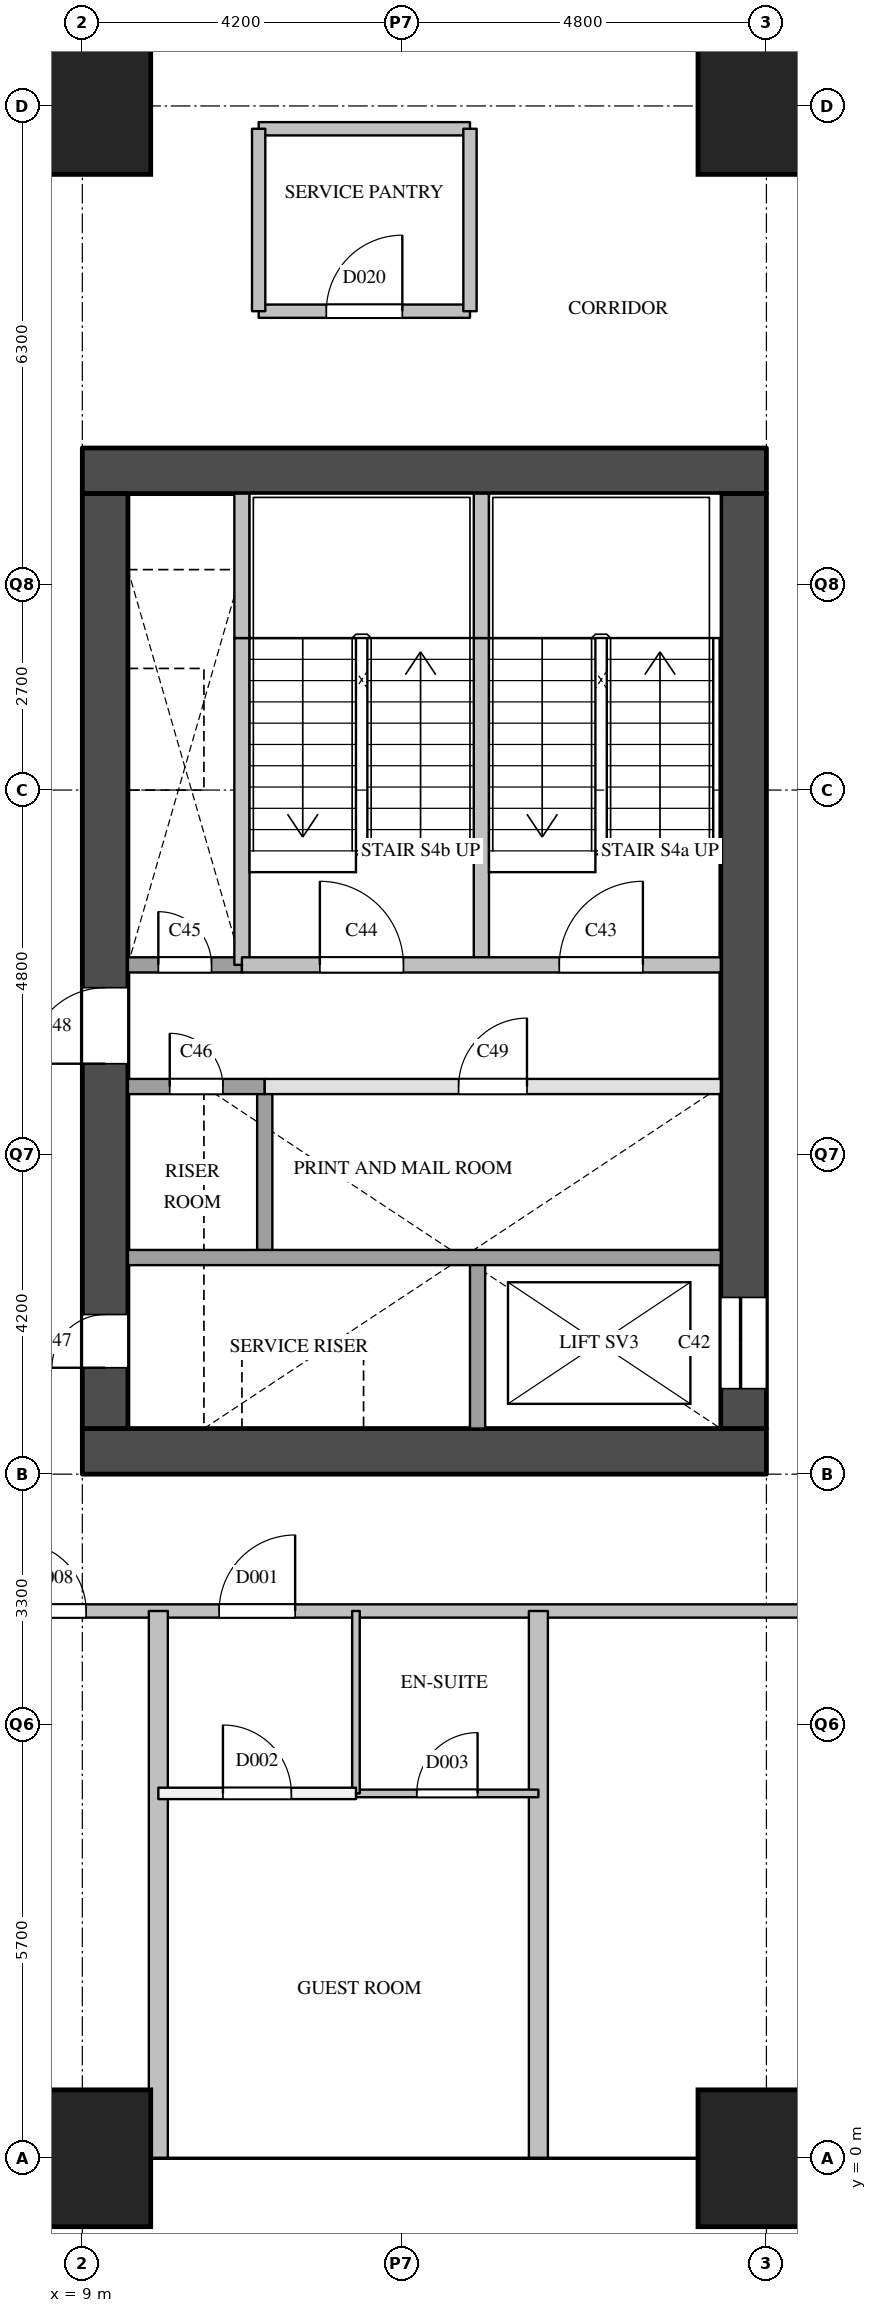
"""IFC4 building model, lengths in metres.
Left out: names, types, materials, properties, quantities, classifications, styles, units other than length and angle.
Written with IfcOpenShell. Run it as: python <this file> out.ifc"""

import sys

from ifc_helpers import new_model, si_unit, direction, frame, frame_2d, origin, origin_2d, place, context, subcontext, project, spatial, rectangle, extrude, element, fill, save


model = new_model("IFC4")
c1 = context("Model", 3, precision=1e-05, world=origin(), true_north=direction((0.0, 1.0)))
c2 = subcontext(c1, "Body", "Model", "MODEL_VIEW")
j1 = project(units=[si_unit("LENGTHUNIT", "METRE"), si_unit("PLANEANGLEUNIT", "RADIAN")], contexts=[c1])
p1 = place(None, origin())
s1 = spatial("IfcSite", under=j1, at=p1, CompositionType="ELEMENT")
p2 = place(p1, origin())
s2 = spatial("IfcBuilding", under=s1, at=p2, CompositionType="ELEMENT")
p3 = place(p2, frame((0.0, 0.0, 42.4)))
s3 = spatial("IfcBuildingStorey", under=s2, at=p3, CompositionType="ELEMENT", Elevation=42.4)
for number, where, z_axis, x_axis in (
    (1, (9.0, 0.0, 0.0), (0.0, 0.0, 1.0), (1.0, 0.0, 0.0)),
    (2, (9.0, 27.0, 0.0), (0.0, 0.0, 1.0), (1.0, 0.0, 0.0)),
    (3, (18.0, 0.0, 0.0), (0.0, 0.0, 1.0), (1.0, 0.0, 0.0)),
    (4, (18.0, 27.0, 0.0), (0.0, 0.0, 1.0), (1.0, 0.0, 0.0)),
):
    element("IfcColumn", number, at=place(p3, frame(where, z_axis=z_axis, x_axis=x_axis)), inside=s3, PredefinedType="COLUMN", context=c2, shape_type="SweptSolid", body=[
        extrude(rectangle(XDim=1.8, YDim=1.8, at=origin_2d()), origin(), (0.0, 0.0, 1.0), 3.8),
    ])
for number, where, z_axis, x_axis in (
    (5, (9.0, 9.3, 0.0), (0.0, 0.0, 1.0), (1.0, 0.0, 0.0)),
    (6, (9.0, 22.2, 0.0), (0.0, 0.0, 1.0), (1.0, 0.0, 0.0)),
):
    element("IfcWall", number, at=place(p3, frame(where, z_axis=z_axis, x_axis=x_axis)), inside=s3, PredefinedType="SHEAR", context=c2, shape_type="SweptSolid", body=[
        extrude(rectangle(XDim=9.0, YDim=0.6, at=frame_2d((4.5, 0.0))), origin(), (0.0, 0.0, 1.0), 3.5),
    ])
p4 = place(p3, frame((9.3, 9.6, 0.0), z_axis=(0.0, 0.0, 1.0), x_axis=(0.0, 1.0, 0.0)))
e7 = element("IfcWall", 7, at=p4, inside=s3, PredefinedType="SHEAR", context=c2, shape_type="SweptSolid", body=[
    extrude(rectangle(XDim=12.3, YDim=0.6, at=frame_2d((6.15, 0.0))), origin(), (0.0, 0.0, 1.0), 3.5),
])
p5 = place(p4, frame((0.8, 0.0, 0.0)))
e8 = element("IfcOpeningElement", 8, at=p5, cuts=e7, PredefinedType="OPENING", context=c2, shape_type="SweptSolid", body=[
    extrude(rectangle(XDim=0.7, YDim=2.1, at=frame_2d((0.35, 1.05))), frame((0.0, 0.31, 0.0), z_axis=(0.0, -1.0, 0.0), x_axis=(1.0, 0.0, 0.0)), (0.0, 0.0, 1.0), 0.62),
])
p6 = place(p4, frame((4.8, 0.0, 0.0)))
e9 = element("IfcOpeningElement", 9, at=p6, cuts=e7, PredefinedType="OPENING", context=c2, shape_type="SweptSolid", body=[
    extrude(rectangle(XDim=1.0, YDim=2.1, at=frame_2d((0.5, 1.05))), frame((0.0, 0.31, 0.0), z_axis=(0.0, -1.0, 0.0), x_axis=(1.0, 0.0, 0.0)), (0.0, 0.0, 1.0), 0.62),
])
p7 = place(p3, frame((17.7, 9.6, 0.0), z_axis=(0.0, 0.0, 1.0), x_axis=(0.0, 1.0, 0.0)))
e10 = element("IfcWall", 10, at=p7, inside=s3, PredefinedType="SHEAR", context=c2, shape_type="SweptSolid", body=[
    extrude(rectangle(XDim=12.3, YDim=0.6, at=frame_2d((6.15, 0.0))), origin(), (0.0, 0.0, 1.0), 3.5),
])
p8 = place(p7, frame((0.525, 0.0, 0.0)))
e11 = element("IfcOpeningElement", 11, at=p8, cuts=e10, PredefinedType="OPENING", context=c2, shape_type="SweptSolid", body=[
    extrude(rectangle(XDim=1.2, YDim=2.1, at=frame_2d((0.6, 1.05))), frame((0.0, 0.31, 0.0), z_axis=(0.0, -1.0, 0.0), x_axis=(1.0, 0.0, 0.0)), (0.0, 0.0, 1.0), 0.62),
])
p9 = place(p3, frame((11.1, 15.7, 0.0), z_axis=(0.0, 0.0, 1.0), x_axis=(0.0, 1.0, 0.0)))
e12 = element("IfcWall", 12, at=p9, inside=s3, PredefinedType="SOLIDWALL", context=c2, shape_type="SweptSolid", body=[
    extrude(rectangle(XDim=4.3, YDim=0.2, at=frame_2d((2.15, 0.0))), origin(), (0.0, 0.0, 1.0), 3.5),
])
p10 = place(p3, frame((11.1, 20.0, 0.0), z_axis=(0.0, 0.0, 1.0), x_axis=(0.0, 1.0, 0.0)))
e13 = element("IfcWall", 13, at=p10, inside=s3, PredefinedType="SOLIDWALL", context=c2, shape_type="SweptSolid", body=[
    extrude(rectangle(XDim=1.9, YDim=0.2, at=frame_2d((0.95, 0.0))), origin(), (0.0, 0.0, 1.0), 3.5),
])
p11 = place(p3, frame((11.4, 11.9, 0.0), z_axis=(0.0, 0.0, 1.0), x_axis=(0.0, 1.0, 0.0)))
e14 = element("IfcWall", 14, at=p11, inside=s3, PredefinedType="SOLIDWALL", context=c2, shape_type="SweptSolid", body=[
    extrude(rectangle(XDim=2.2, YDim=0.2, at=frame_2d((1.1, 0.0))), origin(), (0.0, 0.0, 1.0), 3.5),
])
p12 = place(p3, frame((14.2, 9.6, 0.0), z_axis=(0.0, 0.0, 1.0), x_axis=(0.0, 1.0, 0.0)))
e15 = element("IfcWall", 15, at=p12, inside=s3, PredefinedType="SOLIDWALL", context=c2, shape_type="SweptSolid", body=[
    extrude(rectangle(XDim=2.3, YDim=0.2, at=frame_2d((1.15, 0.0))), origin(), (0.0, 0.0, 1.0), 3.5),
])
p13 = place(p3, frame((14.25, 15.7, 0.0), z_axis=(0.0, 0.0, 1.0), x_axis=(0.0, 1.0, 0.0)))
e16 = element("IfcWall", 16, at=p13, inside=s3, PredefinedType="SOLIDWALL", context=c2, shape_type="SweptSolid", body=[
    extrude(rectangle(XDim=4.3, YDim=0.2, at=frame_2d((2.15, 0.0))), origin(), (0.0, 0.0, 1.0), 3.5),
])
p14 = place(p3, frame((14.25, 20.0, 0.0), z_axis=(0.0, 0.0, 1.0), x_axis=(0.0, 1.0, 0.0)))
e17 = element("IfcWall", 17, at=p14, inside=s3, PredefinedType="SOLIDWALL", context=c2, shape_type="SweptSolid", body=[
    extrude(rectangle(XDim=1.9, YDim=0.2, at=frame_2d((0.95, 0.0))), origin(), (0.0, 0.0, 1.0), 3.5),
])
p15 = place(p3, frame((9.6, 11.85, 0.0), z_axis=(0.0, 0.0, 1.0), x_axis=(1.0, 0.0, 0.0)))
e18 = element("IfcWall", 18, at=p15, inside=s3, PredefinedType="SOLIDWALL", context=c2, shape_type="SweptSolid", body=[
    extrude(rectangle(XDim=7.8, YDim=0.2, at=frame_2d((3.9, 0.0))), origin(), (0.0, 0.0, 1.0), 3.5),
])
p16 = place(p3, frame((11.4, 14.1, 0.0), z_axis=(0.0, 0.0, 1.0), x_axis=(1.0, 0.0, 0.0)))
e19 = element("IfcWall", 19, at=p16, inside=s3, PredefinedType="PARTITIONING", context=c2, shape_type="SweptSolid", body=[
    extrude(rectangle(XDim=6.0, YDim=0.2, at=frame_2d((3.0, 0.0))), origin(), (0.0, 0.0, 1.0), 3.5),
])
p17 = place(p16, frame((2.55, 0.0, 0.0)))
e20 = element("IfcOpeningElement", 20, at=p17, cuts=e19, PredefinedType="OPENING", context=c2, shape_type="SweptSolid", body=[
    extrude(rectangle(XDim=0.9, YDim=2.1, at=frame_2d((0.45, 1.05))), frame((0.0, 0.11, 0.0), z_axis=(0.0, -1.0, 0.0), x_axis=(1.0, 0.0, 0.0)), (0.0, 0.0, 1.0), 0.22),
])
p18 = place(p3, frame((9.6, 14.1, 0.0), z_axis=(0.0, 0.0, 1.0), x_axis=(1.0, 0.0, 0.0)))
e21 = element("IfcWall", 21, at=p18, inside=s3, PredefinedType="SOLIDWALL", context=c2, shape_type="SweptSolid", body=[
    extrude(rectangle(XDim=1.8, YDim=0.2, at=frame_2d((0.9, 0.0))), origin(), (0.0, 0.0, 1.0), 3.5),
])
p19 = place(p18, frame((0.55, 0.0, 0.0)))
e22 = element("IfcOpeningElement", 22, at=p19, cuts=e21, PredefinedType="OPENING", context=c2, shape_type="SweptSolid", body=[
    extrude(rectangle(XDim=0.7, YDim=2.1, at=frame_2d((0.35, 1.05))), frame((0.0, 0.11, 0.0), z_axis=(0.0, -1.0, 0.0), x_axis=(1.0, 0.0, 0.0)), (0.0, 0.0, 1.0), 0.22),
])
p20 = place(p3, frame((9.6, 15.7, 0.0), z_axis=(0.0, 0.0, 1.0), x_axis=(1.0, 0.0, 0.0)))
e23 = element("IfcWall", 23, at=p20, inside=s3, PredefinedType="SOLIDWALL", context=c2, shape_type="SweptSolid", body=[
    extrude(rectangle(XDim=1.5, YDim=0.2, at=frame_2d((0.75, 0.0))), origin(), (0.0, 0.0, 1.0), 3.5),
])
p21 = place(p20, frame((0.4, 0.0, 0.0)))
e24 = element("IfcOpeningElement", 24, at=p21, cuts=e23, PredefinedType="OPENING", context=c2, shape_type="SweptSolid", body=[
    extrude(rectangle(XDim=0.7, YDim=2.1, at=frame_2d((0.35, 1.05))), frame((0.0, 0.11, 0.0), z_axis=(0.0, -1.0, 0.0), x_axis=(1.0, 0.0, 0.0)), (0.0, 0.0, 1.0), 0.22),
])
p22 = place(p3, frame((11.1, 15.7, 0.0), z_axis=(0.0, 0.0, 1.0), x_axis=(1.0, 0.0, 0.0)))
e25 = element("IfcWall", 25, at=p22, inside=s3, PredefinedType="SOLIDWALL", context=c2, shape_type="SweptSolid", body=[
    extrude(rectangle(XDim=6.3, YDim=0.2, at=frame_2d((3.15, 0.0))), origin(), (0.0, 0.0, 1.0), 3.5),
])
p23 = place(p22, frame((4.175, 0.0, 0.0)))
e26 = element("IfcOpeningElement", 26, at=p23, cuts=e25, PredefinedType="OPENING", context=c2, shape_type="SweptSolid", body=[
    extrude(rectangle(XDim=1.1, YDim=2.1, at=frame_2d((0.55, 1.05))), frame((0.0, 0.11, 0.0), z_axis=(0.0, -1.0, 0.0), x_axis=(1.0, 0.0, 0.0)), (0.0, 0.0, 1.0), 0.22),
])
p24 = place(p22, frame((1.025, 0.0, 0.0)))
e27 = element("IfcOpeningElement", 27, at=p24, cuts=e25, PredefinedType="OPENING", context=c2, shape_type="SweptSolid", body=[
    extrude(rectangle(XDim=1.1, YDim=2.1, at=frame_2d((0.55, 1.05))), frame((0.0, 0.11, 0.0), z_axis=(0.0, -1.0, 0.0), x_axis=(1.0, 0.0, 0.0)), (0.0, 0.0, 1.0), 0.22),
])
p25 = place(p3, frame((7.2, 7.2, 0.0), z_axis=(0.0, 0.0, 1.0), x_axis=(1.0, 0.0, 0.0)))
e28 = element("IfcWall", 28, at=p25, inside=s3, PredefinedType="PARTITIONING", context=c2, shape_type="SweptSolid", body=[
    extrude(rectangle(XDim=12.6, YDim=0.175, at=frame_2d((6.3, 0.0))), origin(), (0.0, 0.0, 1.0), 3.5),
])
p26 = place(p25, frame((3.6, 0.0, 0.0)))
e29 = element("IfcOpeningElement", 29, at=p26, cuts=e28, PredefinedType="OPENING", context=c2, shape_type="SweptSolid", body=[
    extrude(rectangle(XDim=1.0, YDim=2.1, at=frame_2d((0.5, 1.05))), frame((0.0, 0.097, 0.0), z_axis=(0.0, -1.0, 0.0), x_axis=(1.0, 0.0, 0.0)), (0.0, 0.0, 1.0), 0.195),
])
p27 = place(p25, frame((0.95, 0.0, 0.0)))
e30 = element("IfcOpeningElement", 30, at=p27, cuts=e28, PredefinedType="OPENING", context=c2, shape_type="SweptSolid", body=[
    extrude(rectangle(XDim=0.9, YDim=2.1, at=frame_2d((0.45, 1.05))), frame((0.0, 0.097, 0.0), z_axis=(0.0, -1.0, 0.0), x_axis=(1.0, 0.0, 0.0)), (0.0, 0.0, 1.0), 0.195),
])
p28 = place(p3, frame((11.32, 24.3, 0.0), z_axis=(0.0, 0.0, 1.0), x_axis=(1.0, 0.0, 0.0)))
e31 = element("IfcWall", 31, at=p28, inside=s3, PredefinedType="PARTITIONING", context=c2, shape_type="SweptSolid", body=[
    extrude(rectangle(XDim=2.78, YDim=0.175, at=frame_2d((1.39, 0.0))), origin(), (0.0, 0.0, 1.0), 3.5),
])
p29 = place(p28, frame((0.89, 0.0, 0.0)))
e32 = element("IfcOpeningElement", 32, at=p29, cuts=e31, PredefinedType="OPENING", context=c2, shape_type="SweptSolid", body=[
    extrude(rectangle(XDim=1.0, YDim=2.1, at=frame_2d((0.5, 1.05))), frame((0.0, 0.097, 0.0), z_axis=(0.0, -1.0, 0.0), x_axis=(1.0, 0.0, 0.0)), (0.0, 0.0, 1.0), 0.195),
])
p30 = place(p3, frame((11.32, 26.7, 0.0), z_axis=(0.0, 0.0, 1.0), x_axis=(1.0, 0.0, 0.0)))
e33 = element("IfcWall", 33, at=p30, inside=s3, PredefinedType="PARTITIONING", context=c2, shape_type="SweptSolid", body=[
    extrude(rectangle(XDim=2.78, YDim=0.175, at=frame_2d((1.39, 0.0))), origin(), (0.0, 0.0, 1.0), 2.5),
])
for number, where, z_axis, x_axis in (
    (34, (11.32, 24.3, 0.0), (0.0, 0.0, 1.0), (0.0, 1.0, 0.0)),
    (35, (14.1, 24.3, 0.0), (0.0, 0.0, 1.0), (0.0, 1.0, 0.0)),
):
    element("IfcWall", number, at=place(p3, frame(where, z_axis=z_axis, x_axis=x_axis)), inside=s3, PredefinedType="PARTITIONING", context=c2, shape_type="SweptSolid", body=[
        extrude(rectangle(XDim=2.4, YDim=0.175, at=frame_2d((1.2, 0.0))), origin(), (0.0, 0.0, 1.0), 2.5),
    ])
p31 = place(p3, frame((10.0, 4.8, 0.0), z_axis=(0.0, 0.0, 1.0), x_axis=(1.0, 0.0, 0.0)))
e36 = element("IfcWall", 36, at=p31, inside=s3, PredefinedType="PARTITIONING", context=c2, shape_type="SweptSolid", body=[
    extrude(rectangle(XDim=2.6, YDim=0.15, at=frame_2d((1.3, 0.0))), origin(), (0.0, 0.0, 1.0), 3.5),
])
p32 = place(p31, frame((0.85, 0.0, 0.0)))
e37 = element("IfcOpeningElement", 37, at=p32, cuts=e36, PredefinedType="OPENING", context=c2, shape_type="SweptSolid", body=[
    extrude(rectangle(XDim=0.9, YDim=2.1, at=frame_2d((0.45, 1.05))), frame((0.0, 0.085, 0.0), z_axis=(0.0, -1.0, 0.0), x_axis=(1.0, 0.0, 0.0)), (0.0, 0.0, 1.0), 0.17),
])
for number, where, z_axis, x_axis in (
    (38, (10.0, 0.0, 0.0), (0.0, 0.0, 1.0), (0.0, 1.0, 0.0)),
    (39, (15.0, 0.0, 0.0), (0.0, 0.0, 1.0), (0.0, 1.0, 0.0)),
):
    element("IfcWall", number, at=place(p3, frame(where, z_axis=z_axis, x_axis=x_axis)), inside=s3, PredefinedType="PARTITIONING", context=c2, shape_type="SweptSolid", body=[
        extrude(rectangle(XDim=7.2, YDim=0.25, at=frame_2d((3.6, 0.0))), origin(), (0.0, 0.0, 1.0), 2.5),
    ])
p33 = place(p3, frame((12.6, 4.8, 0.0), z_axis=(0.0, 0.0, 1.0), x_axis=(1.0, 0.0, 0.0)))
e40 = element("IfcWall", 40, at=p33, inside=s3, PredefinedType="PARTITIONING", context=c2, shape_type="SweptSolid", body=[
    extrude(rectangle(XDim=2.4, YDim=0.1, at=frame_2d((1.2, 0.0))), origin(), (0.0, 0.0, 1.0), 3.5),
])
p34 = place(p33, frame((0.8, 0.0, 0.0)))
e41 = element("IfcOpeningElement", 41, at=p34, cuts=e40, PredefinedType="OPENING", context=c2, shape_type="SweptSolid", body=[
    extrude(rectangle(XDim=0.8, YDim=2.1, at=frame_2d((0.4, 1.05))), frame((0.0, 0.06, 0.0), z_axis=(0.0, -1.0, 0.0), x_axis=(1.0, 0.0, 0.0)), (0.0, 0.0, 1.0), 0.12),
])
p35 = place(p3, frame((12.6, 4.8, 0.0), z_axis=(0.0, 0.0, 1.0), x_axis=(0.0, 1.0, 0.0)))
e42 = element("IfcWall", 42, at=p35, inside=s3, PredefinedType="PARTITIONING", context=c2, shape_type="SweptSolid", body=[
    extrude(rectangle(XDim=2.4, YDim=0.1, at=frame_2d((1.2, 0.0))), origin(), (0.0, 0.0, 1.0), 3.5),
])
p36 = place(p8, origin())
e43 = element("IfcDoor", 43, at=p36, inside=s3, OperationType="SLIDING_TO_LEFT", PredefinedType="DOOR", context=c2, shape_type="SweptSolid", body=[
    extrude(rectangle(XDim=1.2, YDim=2.1, at=frame_2d((0.6, 1.05))), frame((0.0, 0.025, 0.0), z_axis=(0.0, -1.0, 0.0), x_axis=(1.0, 0.0, 0.0)), (0.0, 0.0, 1.0), 0.05),
])
fill(e11, e43)
p37 = place(p23, origin())
e44 = element("IfcDoor", 44, at=p37, inside=s3, OperationType="SINGLE_SWING_RIGHT", PredefinedType="DOOR", context=c2, shape_type="SweptSolid", body=[
    extrude(rectangle(XDim=1.1, YDim=2.1, at=frame_2d((0.55, 1.05))), frame((0.0, 0.025, 0.0), z_axis=(0.0, -1.0, 0.0), x_axis=(1.0, 0.0, 0.0)), (0.0, 0.0, 1.0), 0.05),
])
fill(e26, e44)
p38 = place(p24, origin())
e45 = element("IfcDoor", 45, at=p38, inside=s3, OperationType="SINGLE_SWING_LEFT", PredefinedType="DOOR", context=c2, shape_type="SweptSolid", body=[
    extrude(rectangle(XDim=1.1, YDim=2.1, at=frame_2d((0.55, 1.05))), frame((0.0, 0.025, 0.0), z_axis=(0.0, -1.0, 0.0), x_axis=(1.0, 0.0, 0.0)), (0.0, 0.0, 1.0), 0.05),
])
fill(e27, e45)
p39 = place(p21, origin())
e46 = element("IfcDoor", 46, at=p39, inside=s3, OperationType="SINGLE_SWING_LEFT", PredefinedType="DOOR", context=c2, shape_type="SweptSolid", body=[
    extrude(rectangle(XDim=0.7, YDim=2.1, at=frame_2d((0.35, 1.05))), frame((0.0, 0.025, 0.0), z_axis=(0.0, -1.0, 0.0), x_axis=(1.0, 0.0, 0.0)), (0.0, 0.0, 1.0), 0.05),
])
fill(e24, e46)
p40 = place(p19, origin())
e47 = element("IfcDoor", 47, at=p40, inside=s3, OperationType="SINGLE_SWING_LEFT", PredefinedType="DOOR", context=c2, shape_type="SweptSolid", body=[
    extrude(rectangle(XDim=0.7, YDim=2.1, at=frame_2d((0.35, 1.05))), frame((0.0, 0.025, 0.0), z_axis=(0.0, -1.0, 0.0), x_axis=(1.0, 0.0, 0.0)), (0.0, 0.0, 1.0), 0.05),
])
fill(e22, e47)
p41 = place(p5, origin())
e48 = element("IfcDoor", 48, at=p41, inside=s3, OperationType="SINGLE_SWING_LEFT", PredefinedType="DOOR", context=c2, shape_type="SweptSolid", body=[
    extrude(rectangle(XDim=0.7, YDim=2.1, at=frame_2d((0.35, 1.05))), frame((0.0, 0.025, 0.0), z_axis=(0.0, -1.0, 0.0), x_axis=(1.0, 0.0, 0.0)), (0.0, 0.0, 1.0), 0.05),
])
fill(e8, e48)
p42 = place(p6, origin())
e49 = element("IfcDoor", 49, at=p42, inside=s3, OperationType="SINGLE_SWING_LEFT", PredefinedType="DOOR", context=c2, shape_type="SweptSolid", body=[
    extrude(rectangle(XDim=1.0, YDim=2.1, at=frame_2d((0.5, 1.05))), frame((0.0, 0.025, 0.0), z_axis=(0.0, -1.0, 0.0), x_axis=(1.0, 0.0, 0.0)), (0.0, 0.0, 1.0), 0.05),
])
fill(e9, e49)
p43 = place(p17, origin())
e50 = element("IfcDoor", 50, at=p43, inside=s3, OperationType="SINGLE_SWING_RIGHT", PredefinedType="DOOR", context=c2, shape_type="SweptSolid", body=[
    extrude(rectangle(XDim=0.9, YDim=2.1, at=frame_2d((0.45, 1.05))), frame((0.0, 0.025, 0.0), z_axis=(0.0, -1.0, 0.0), x_axis=(1.0, 0.0, 0.0)), (0.0, 0.0, 1.0), 0.05),
])
fill(e20, e50)
p44 = place(p26, origin())
e51 = element("IfcDoor", 51, at=p44, inside=s3, OperationType="SINGLE_SWING_RIGHT", PredefinedType="DOOR", context=c2, shape_type="SweptSolid", body=[
    extrude(rectangle(XDim=1.0, YDim=2.1, at=frame_2d((0.5, 1.05))), frame((0.0, 0.025, 0.0), z_axis=(0.0, -1.0, 0.0), x_axis=(1.0, 0.0, 0.0)), (0.0, 0.0, 1.0), 0.05),
])
fill(e29, e51)
p45 = place(p32, origin())
e52 = element("IfcDoor", 52, at=p45, inside=s3, OperationType="SINGLE_SWING_LEFT", PredefinedType="DOOR", context=c2, shape_type="SweptSolid", body=[
    extrude(rectangle(XDim=0.9, YDim=2.1, at=frame_2d((0.45, 1.05))), frame((0.0, 0.025, 0.0), z_axis=(0.0, -1.0, 0.0), x_axis=(1.0, 0.0, 0.0)), (0.0, 0.0, 1.0), 0.05),
])
fill(e37, e52)
p46 = place(p34, origin())
e53 = element("IfcDoor", 53, at=p46, inside=s3, OperationType="SINGLE_SWING_RIGHT", PredefinedType="DOOR", context=c2, shape_type="SweptSolid", body=[
    extrude(rectangle(XDim=0.8, YDim=2.1, at=frame_2d((0.4, 1.05))), frame((0.0, 0.025, 0.0), z_axis=(0.0, -1.0, 0.0), x_axis=(1.0, 0.0, 0.0)), (0.0, 0.0, 1.0), 0.05),
])
fill(e41, e53)
p47 = place(p27, origin())
e54 = element("IfcDoor", 54, at=p47, inside=s3, OperationType="SINGLE_SWING_LEFT", PredefinedType="DOOR", context=c2, shape_type="SweptSolid", body=[
    extrude(rectangle(XDim=0.9, YDim=2.1, at=frame_2d((0.45, 1.05))), frame((0.0, 0.025, 0.0), z_axis=(0.0, -1.0, 0.0), x_axis=(1.0, 0.0, 0.0)), (0.0, 0.0, 1.0), 0.05),
])
fill(e30, e54)
p48 = place(p29, origin())
e55 = element("IfcDoor", 55, at=p48, inside=s3, OperationType="SINGLE_SWING_RIGHT", PredefinedType="DOOR", context=c2, shape_type="SweptSolid", body=[
    extrude(rectangle(XDim=1.0, YDim=2.1, at=frame_2d((0.5, 1.05))), frame((0.0, 0.025, 0.0), z_axis=(0.0, -1.0, 0.0), x_axis=(1.0, 0.0, 0.0)), (0.0, 0.0, 1.0), 0.05),
])
fill(e32, e55)
save(model, sys.argv[1])
